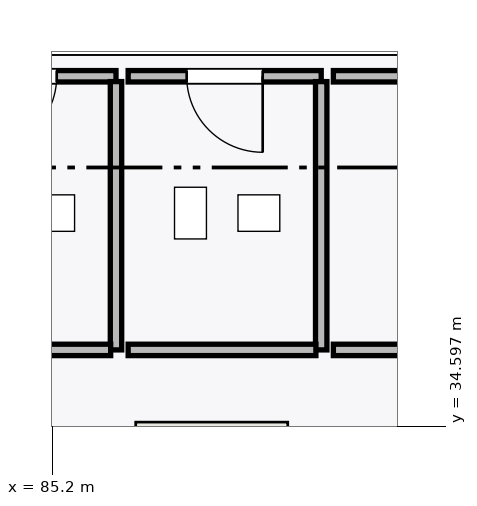
"""IFC4 building model, lengths in metres.
Left out: names, types, materials, properties, quantities, classifications, styles, units other than length and angle.
Written with IfcOpenShell. Run it as: python <this file> out.ifc"""

import sys

from ifc_helpers import new_model, si_unit, direction, frame, frame_2d, origin, place, context, subcontext, project, spatial, rectangle, extrude, element, fill, save


model = new_model("IFC4")
c1 = context("Model", 3, precision=1e-05, world=origin(), true_north=direction((0.0, 1.0)))
c2 = subcontext(c1, "Body", "Model", "MODEL_VIEW")
j1 = project(units=[si_unit("LENGTHUNIT", "METRE"), si_unit("PLANEANGLEUNIT", "RADIAN")], contexts=[c1])
p1 = place(None, origin())
s1 = spatial("IfcSite", under=j1, at=p1, CompositionType="ELEMENT")
p2 = place(p1, origin())
s2 = spatial("IfcBuilding", under=s1, at=p2, CompositionType="ELEMENT")
p3 = place(p2, frame((0.0, 0.0, -5.4)))
s3 = spatial("IfcBuildingStorey", under=s2, at=p3, CompositionType="ELEMENT", Elevation=-5.4)
p4 = place(p3, frame((86.04, 39.2, 0.0), z_axis=(0.0, 0.0, 1.0), x_axis=(-1.0, 0.0, 0.0)))
e1 = element("IfcWall", 1, at=p4, inside=s3, PredefinedType="PARTITIONING", context=c2, shape_type="SweptSolid", body=[
    extrude(rectangle(XDim=2.54, YDim=0.15, at=frame_2d((1.27, 0.0))), origin(), (0.0, 0.0, 1.0), 5.145),
])
p5 = place(p4, frame((0.78, 0.0, 0.0)))
e2 = element("IfcOpeningElement", 2, at=p5, cuts=e1, PredefinedType="OPENING", context=c2, shape_type="SweptSolid", body=[
    extrude(rectangle(XDim=0.98, YDim=2.1, at=frame_2d((0.49, 1.05))), frame((0.0, 0.085, 0.0), z_axis=(0.0, -1.0, 0.0), x_axis=(1.0, 0.0, 0.0)), (0.0, 0.0, 1.0), 0.17),
])
p6 = place(p3, frame((86.04, 35.6, 0.0), z_axis=(0.0, 0.0, 1.0), x_axis=(0.0, 1.0, 0.0)))
e3 = element("IfcWall", 3, at=p6, inside=s3, PredefinedType="PARTITIONING", context=c2, shape_type="SweptSolid", body=[
    extrude(rectangle(XDim=3.53, YDim=0.15, at=frame_2d((1.765, 0.0))), origin(), (0.0, 0.0, 1.0), 5.145),
])
p7 = place(p3, frame((83.5, 35.6, 0.0), z_axis=(0.0, 0.0, 1.0), x_axis=(1.0, 0.0, 0.0)))
e4 = element("IfcWall", 4, at=p7, inside=s3, PredefinedType="PARTITIONING", context=c2, shape_type="SweptSolid", body=[
    extrude(rectangle(XDim=2.47, YDim=0.15, at=frame_2d((1.235, 0.0))), origin(), (0.0, 0.0, 1.0), 5.145),
])
p8 = place(p3, frame((88.74, 39.2, 0.0), z_axis=(0.0, 0.0, 1.0), x_axis=(-1.0, 0.0, 0.0)))
e5 = element("IfcWall", 5, at=p8, inside=s3, PredefinedType="PARTITIONING", context=c2, shape_type="SweptSolid", body=[
    extrude(rectangle(XDim=2.54, YDim=0.15, at=frame_2d((1.27, 0.0))), origin(), (0.0, 0.0, 1.0), 5.145),
])
p9 = place(p8, frame((0.77, 0.0, 0.0)))
e6 = element("IfcOpeningElement", 6, at=p9, cuts=e5, PredefinedType="OPENING", context=c2, shape_type="SweptSolid", body=[
    extrude(rectangle(XDim=1.0, YDim=2.1, at=frame_2d((0.5, 1.05))), frame((0.0, 0.085, 0.0), z_axis=(0.0, -1.0, 0.0), x_axis=(1.0, 0.0, 0.0)), (0.0, 0.0, 1.0), 0.17),
])
p10 = place(p3, frame((88.74, 35.6, 0.0), z_axis=(0.0, 0.0, 1.0), x_axis=(0.0, 1.0, 0.0)))
e7 = element("IfcWall", 7, at=p10, inside=s3, PredefinedType="PARTITIONING", context=c2, shape_type="SweptSolid", body=[
    extrude(rectangle(XDim=3.53, YDim=0.15, at=frame_2d((1.765, 0.0))), origin(), (0.0, 0.0, 1.0), 5.145),
])
p11 = place(p3, frame((86.2, 35.6, 0.0), z_axis=(0.0, 0.0, 1.0), x_axis=(1.0, 0.0, 0.0)))
e8 = element("IfcWall", 8, at=p11, inside=s3, PredefinedType="PARTITIONING", context=c2, shape_type="SweptSolid", body=[
    extrude(rectangle(XDim=2.47, YDim=0.15, at=frame_2d((1.235, 0.0))), origin(), (0.0, 0.0, 1.0), 5.145),
])
p12 = place(p3, frame((92.34, 39.2, 0.0), z_axis=(0.0, 0.0, 1.0), x_axis=(-1.0, 0.0, 0.0)))
e9 = element("IfcWall", 9, at=p12, inside=s3, PredefinedType="PARTITIONING", context=c2, shape_type="SweptSolid", body=[
    extrude(rectangle(XDim=3.44, YDim=0.15, at=frame_2d((1.72, 0.0))), origin(), (0.0, 0.0, 1.0), 5.145),
])
p13 = place(p12, frame((1.23, 0.0, 0.0)))
e10 = element("IfcOpeningElement", 10, at=p13, cuts=e9, PredefinedType="OPENING", context=c2, shape_type="SweptSolid", body=[
    extrude(rectangle(XDim=0.98, YDim=2.1, at=frame_2d((0.49, 1.05))), frame((0.0, 0.085, 0.0), z_axis=(0.0, -1.0, 0.0), x_axis=(1.0, 0.0, 0.0)), (0.0, 0.0, 1.0), 0.17),
])
p14 = place(p3, frame((88.9, 35.6, 0.0), z_axis=(0.0, 0.0, 1.0), x_axis=(1.0, 0.0, 0.0)))
e11 = element("IfcWall", 11, at=p14, inside=s3, PredefinedType="PARTITIONING", context=c2, shape_type="SweptSolid", body=[
    extrude(rectangle(XDim=3.37, YDim=0.15, at=frame_2d((1.685, 0.0))), origin(), (0.0, 0.0, 1.0), 5.145),
])
p15 = place(p5, origin())
e12 = element("IfcDoor", 12, at=p15, inside=s3, OperationType="SINGLE_SWING_RIGHT", PredefinedType="DOOR", context=c2, shape_type="SweptSolid", body=[
    extrude(rectangle(XDim=0.98, YDim=2.1, at=frame_2d((0.49, 1.05))), frame((0.0, 0.025, 0.0), z_axis=(0.0, -1.0, 0.0), x_axis=(1.0, 0.0, 0.0)), (0.0, 0.0, 1.0), 0.05),
])
fill(e2, e12)
p16 = place(p9, origin())
e13 = element("IfcDoor", 13, at=p16, inside=s3, OperationType="SINGLE_SWING_LEFT", PredefinedType="DOOR", context=c2, shape_type="SweptSolid", body=[
    extrude(rectangle(XDim=1.0, YDim=2.1, at=frame_2d((0.5, 1.05))), frame((0.0, 0.025, 0.0), z_axis=(0.0, -1.0, 0.0), x_axis=(1.0, 0.0, 0.0)), (0.0, 0.0, 1.0), 0.05),
])
fill(e6, e13)
save(model, sys.argv[1])
